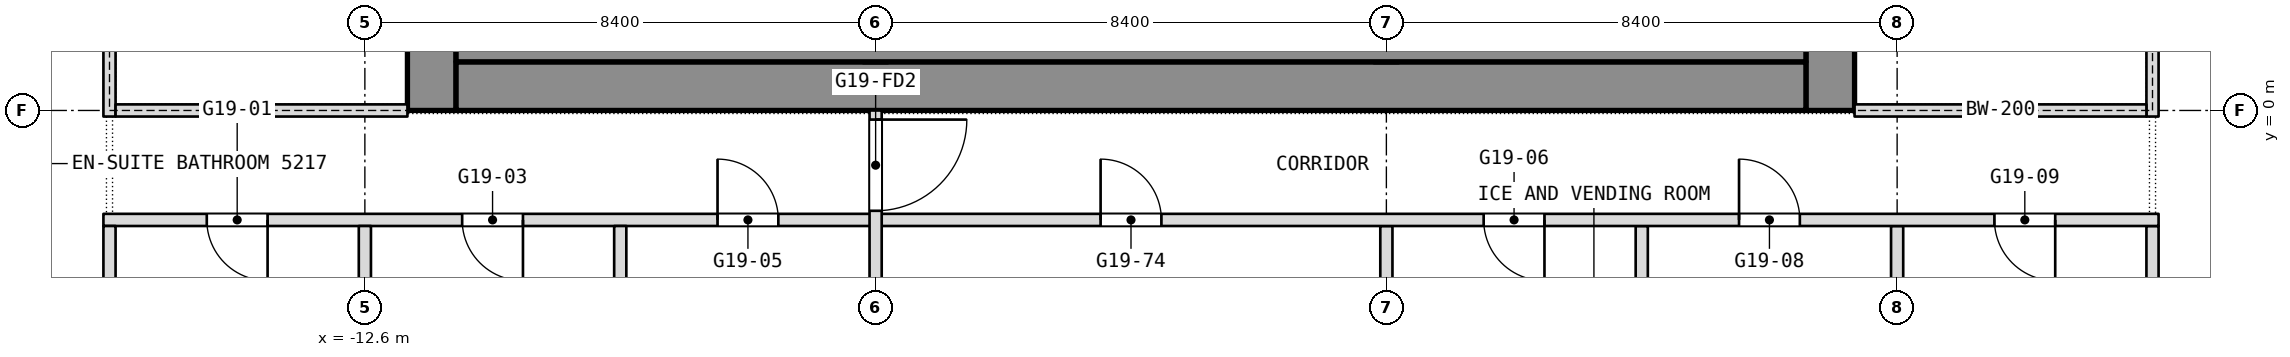
"""IFC4 building model, lengths in metres.
Left out: names, types, materials, properties, quantities, classifications, styles, units other than length and angle.
Written with IfcOpenShell. Run it as: python <this file> out.ifc"""

import sys

from ifc_helpers import new_model, si_unit, direction, frame, frame_2d, origin, place, context, subcontext, project, spatial, rectangle, extrude, element, fill, save


model = new_model("IFC4")
c1 = context("Model", 3, precision=1e-05, world=origin(), true_north=direction((0.0, 1.0)))
c2 = subcontext(c1, "Body", "Model", "MODEL_VIEW")
j1 = project(units=[si_unit("LENGTHUNIT", "METRE"), si_unit("PLANEANGLEUNIT", "RADIAN")], contexts=[c1])
p1 = place(None, origin())
s1 = spatial("IfcSite", under=j1, at=p1, CompositionType="ELEMENT")
p2 = place(p1, origin())
s2 = spatial("IfcBuilding", under=s1, at=p2, CompositionType="ELEMENT")
p3 = place(p2, frame((0.0, 0.0, 223.7)))
s3 = spatial("IfcBuildingStorey", under=s2, at=p3, CompositionType="ELEMENT", Elevation=223.7)
p4 = place(p3, frame((11.5, 0.0, 0.0), z_axis=(0.0, 0.0, 1.0), x_axis=(0.0, 1.0, 0.0)))
e1 = element("IfcWall", 1, at=p4, inside=s3, PredefinedType="SHEAR", context=c2, shape_type="SweptSolid", body=[
    extrude(rectangle(XDim=16.8, YDim=0.8, at=frame_2d((8.4, 0.0))), origin(), (0.0, 0.0, 1.0), 3.6),
])
p5 = place(p4, frame((2.3, 0.0, 0.0)))
e2 = element("IfcOpeningElement", 2, at=p5, cuts=e1, PredefinedType="OPENING", context=c2, shape_type="SweptSolid", body=[
    extrude(rectangle(XDim=1.1, YDim=2.1, at=frame_2d((0.55, 1.05))), frame((0.0, 0.4, 0.0), z_axis=(0.0, -1.0, 0.0), x_axis=(1.0, 0.0, 0.0)), (0.0, 0.0, 1.0), 0.8),
])
p6 = place(p4, frame((4.85, 0.0, 0.0)))
e3 = element("IfcOpeningElement", 3, at=p6, cuts=e1, PredefinedType="OPENING", context=c2, shape_type="SweptSolid", body=[
    extrude(rectangle(XDim=1.1, YDim=2.1, at=frame_2d((0.55, 1.05))), frame((0.0, 0.4, 0.0), z_axis=(0.0, -1.0, 0.0), x_axis=(1.0, 0.0, 0.0)), (0.0, 0.0, 1.0), 0.8),
])
p7 = place(p4, frame((6.825, 0.0, 0.0)))
e4 = element("IfcOpeningElement", 4, at=p7, cuts=e1, PredefinedType="OPENING", context=c2, shape_type="SweptSolid", body=[
    extrude(rectangle(XDim=1.2, YDim=2.1, at=frame_2d((0.6, 1.05))), frame((0.0, 0.4, 0.0), z_axis=(0.0, -1.0, 0.0), x_axis=(1.0, 0.0, 0.0)), (0.0, 0.0, 1.0), 0.8),
])
p8 = place(p4, frame((13.4, 0.0, 0.0)))
e5 = element("IfcOpeningElement", 5, at=p8, cuts=e1, PredefinedType="OPENING", context=c2, shape_type="SweptSolid", body=[
    extrude(rectangle(XDim=1.1, YDim=2.1, at=frame_2d((0.55, 1.05))), frame((0.0, 0.4, 0.0), z_axis=(0.0, -1.0, 0.0), x_axis=(1.0, 0.0, 0.0)), (0.0, 0.0, 1.0), 0.8),
])
p9 = place(p4, frame((10.85, 0.0, 0.0)))
e6 = element("IfcOpeningElement", 6, at=p9, cuts=e1, PredefinedType="OPENING", context=c2, shape_type="SweptSolid", body=[
    extrude(rectangle(XDim=1.1, YDim=2.1, at=frame_2d((0.55, 1.05))), frame((0.0, 0.4, 0.0), z_axis=(0.0, -1.0, 0.0), x_axis=(1.0, 0.0, 0.0)), (0.0, 0.0, 1.0), 0.8),
])
p10 = place(p4, frame((8.775, 0.0, 0.0)))
e7 = element("IfcOpeningElement", 7, at=p10, cuts=e1, PredefinedType="OPENING", context=c2, shape_type="SweptSolid", body=[
    extrude(rectangle(XDim=1.2, YDim=2.1, at=frame_2d((0.6, 1.05))), frame((0.0, 0.4, 0.0), z_axis=(0.0, -1.0, 0.0), x_axis=(1.0, 0.0, 0.0)), (0.0, 0.0, 1.0), 0.8),
])
p11 = place(p3, frame((-11.5, 0.0, 0.0), z_axis=(0.0, 0.0, 1.0), x_axis=(0.0, 1.0, 0.0)))
e8 = element("IfcWall", 8, at=p11, inside=s3, PredefinedType="SHEAR", context=c2, shape_type="SweptSolid", body=[
    extrude(rectangle(XDim=16.8, YDim=0.8, at=frame_2d((8.4, 0.0))), origin(), (0.0, 0.0, 1.0), 3.6),
])
p12 = place(p11, frame((1.688, 0.0, 0.0)))
e9 = element("IfcOpeningElement", 9, at=p12, cuts=e8, PredefinedType="OPENING", context=c2, shape_type="SweptSolid", body=[
    extrude(rectangle(XDim=0.9, YDim=2.1, at=frame_2d((0.45, 1.05))), frame((0.0, 0.4, 0.0), z_axis=(0.0, -1.0, 0.0), x_axis=(1.0, 0.0, 0.0)), (0.0, 0.0, 1.0), 0.8),
])
p13 = place(p11, frame((4.312, 0.0, 0.0)))
e10 = element("IfcOpeningElement", 10, at=p13, cuts=e8, PredefinedType="OPENING", context=c2, shape_type="SweptSolid", body=[
    extrude(rectangle(XDim=0.9, YDim=2.1, at=frame_2d((0.45, 1.05))), frame((0.0, 0.4, 0.0), z_axis=(0.0, -1.0, 0.0), x_axis=(1.0, 0.0, 0.0)), (0.0, 0.0, 1.0), 0.8),
])
p14 = place(p11, frame((6.825, 0.0, 0.0)))
e11 = element("IfcOpeningElement", 11, at=p14, cuts=e8, PredefinedType="OPENING", context=c2, shape_type="SweptSolid", body=[
    extrude(rectangle(XDim=1.2, YDim=2.1, at=frame_2d((0.6, 1.05))), frame((0.0, 0.4, 0.0), z_axis=(0.0, -1.0, 0.0), x_axis=(1.0, 0.0, 0.0)), (0.0, 0.0, 1.0), 0.8),
])
p15 = place(p11, frame((12.3, 0.0, 0.0)))
e12 = element("IfcOpeningElement", 12, at=p15, cuts=e8, PredefinedType="OPENING", context=c2, shape_type="SweptSolid", body=[
    extrude(rectangle(XDim=0.9, YDim=2.1, at=frame_2d((0.45, 1.05))), frame((0.0, 0.4, 0.0), z_axis=(0.0, -1.0, 0.0), x_axis=(1.0, 0.0, 0.0)), (0.0, 0.0, 1.0), 0.8),
])
p16 = place(p11, frame((8.775, 0.0, 0.0)))
e13 = element("IfcOpeningElement", 13, at=p16, cuts=e8, PredefinedType="OPENING", context=c2, shape_type="SweptSolid", body=[
    extrude(rectangle(XDim=1.2, YDim=2.1, at=frame_2d((0.6, 1.05))), frame((0.0, 0.4, 0.0), z_axis=(0.0, -1.0, 0.0), x_axis=(1.0, 0.0, 0.0)), (0.0, 0.0, 1.0), 0.8),
])
p17 = place(p3, frame((-11.1, 0.4, 0.0), z_axis=(0.0, 0.0, 1.0), x_axis=(1.0, 0.0, 0.0)))
e14 = element("IfcWall", 14, at=p17, inside=s3, PredefinedType="SHEAR", context=c2, shape_type="SweptSolid", body=[
    extrude(rectangle(XDim=22.2, YDim=0.8, at=frame_2d((11.1, 0.0))), origin(), (0.0, 0.0, 1.0), 3.6),
])
p18 = place(p3, frame((-4.2, 0.8, 0.0), z_axis=(0.0, 0.0, 1.0), x_axis=(0.0, 1.0, 0.0)))
e15 = element("IfcWall", 15, at=p18, inside=s3, PredefinedType="SHEAR", context=c2, shape_type="SweptSolid", body=[
    extrude(rectangle(XDim=15.2, YDim=0.4, at=frame_2d((7.6, 0.0))), origin(), (0.0, 0.0, 1.0), 3.6),
])
p19 = place(p18, frame((8.5, 0.0, 0.0)))
e16 = element("IfcOpeningElement", 16, at=p19, cuts=e15, PredefinedType="OPENING", context=c2, shape_type="SweptSolid", body=[
    extrude(rectangle(XDim=1.2, YDim=2.1, at=frame_2d((0.6, 1.05))), frame((0.0, 0.2, 0.0), z_axis=(0.0, -1.0, 0.0), x_axis=(1.0, 0.0, 0.0)), (0.0, 0.0, 1.0), 0.4),
])
p20 = place(p3, frame((4.2, 0.8, 0.0), z_axis=(0.0, 0.0, 1.0), x_axis=(0.0, 1.0, 0.0)))
e17 = element("IfcWall", 17, at=p20, inside=s3, PredefinedType="SHEAR", context=c2, shape_type="SweptSolid", body=[
    extrude(rectangle(XDim=15.2, YDim=0.4, at=frame_2d((7.6, 0.0))), origin(), (0.0, 0.0, 1.0), 3.6),
])
p21 = place(p20, frame((5.95, 0.0, 0.0)))
e18 = element("IfcOpeningElement", 18, at=p21, cuts=e17, PredefinedType="OPENING", context=c2, shape_type="SweptSolid", body=[
    extrude(rectangle(XDim=1.2, YDim=2.1, at=frame_2d((0.6, 1.05))), frame((0.0, 0.2, 0.0), z_axis=(0.0, -1.0, 0.0), x_axis=(1.0, 0.0, 0.0)), (0.0, 0.0, 1.0), 0.4),
])
for number, where, z_axis, x_axis in (
    (19, (16.8, -7.8, 0.0), (0.0, 0.0, 1.0), (0.0, 1.0, 0.0)),
    (20, (12.6, -7.8, 0.0), (0.0, 0.0, 1.0), (0.0, 1.0, 0.0)),
):
    element("IfcWall", number, at=place(p3, frame(where, z_axis=z_axis, x_axis=x_axis)), inside=s3, PredefinedType="PARTITIONING", context=c2, shape_type="SweptSolid", body=[
        extrude(rectangle(XDim=5.9, YDim=0.2, at=frame_2d((2.95, 0.0))), origin(), (0.0, 0.0, 1.0), 3.34),
    ])
p22 = place(p3, frame((8.4, -8.0, 0.0), z_axis=(0.0, 0.0, 1.0), x_axis=(0.0, 1.0, 0.0)))
e21 = element("IfcWall", 21, at=p22, inside=s3, PredefinedType="PARTITIONING", context=c2, shape_type="SweptSolid", body=[
    extrude(rectangle(XDim=6.1, YDim=0.2, at=frame_2d((3.05, 0.0))), origin(), (0.0, 0.0, 1.0), 3.34),
])
p23 = place(p3, frame((4.2, -11.6, 0.0), z_axis=(0.0, 0.0, 1.0), x_axis=(0.0, 1.0, 0.0)))
e22 = element("IfcWall", 22, at=p23, inside=s3, PredefinedType="PARTITIONING", context=c2, shape_type="SweptSolid", body=[
    extrude(rectangle(XDim=9.7, YDim=0.2, at=frame_2d((4.85, 0.0))), origin(), (0.0, 0.0, 1.0), 3.34),
])
p24 = place(p3, frame((-16.9, -1.8, 0.0), z_axis=(0.0, 0.0, 1.0), x_axis=(1.0, 0.0, 0.0)))
e23 = element("IfcWall", 23, at=p24, inside=s3, PredefinedType="PARTITIONING", context=c2, shape_type="SweptSolid", body=[
    extrude(rectangle(XDim=33.8, YDim=0.2, at=frame_2d((16.9, 0.0))), origin(), (0.0, 0.0, 1.0), 3.34),
])
p25 = place(p24, frame((1.7, 0.0, 0.0)))
e24 = element("IfcOpeningElement", 24, at=p25, cuts=e23, PredefinedType="OPENING", context=c2, shape_type="SweptSolid", body=[
    extrude(rectangle(XDim=1.0, YDim=2.1, at=frame_2d((0.5, 1.05))), frame((0.0, 0.1, 0.0), z_axis=(0.0, -1.0, 0.0), x_axis=(1.0, 0.0, 0.0)), (0.0, 0.0, 1.0), 0.2),
])
p26 = place(p24, frame((5.9, 0.0, 0.0)))
e25 = element("IfcOpeningElement", 25, at=p26, cuts=e23, PredefinedType="OPENING", context=c2, shape_type="SweptSolid", body=[
    extrude(rectangle(XDim=1.0, YDim=2.1, at=frame_2d((0.5, 1.05))), frame((0.0, 0.1, 0.0), z_axis=(0.0, -1.0, 0.0), x_axis=(1.0, 0.0, 0.0)), (0.0, 0.0, 1.0), 0.2),
])
p27 = place(p24, frame((10.1, 0.0, 0.0)))
e26 = element("IfcOpeningElement", 26, at=p27, cuts=e23, PredefinedType="OPENING", context=c2, shape_type="SweptSolid", body=[
    extrude(rectangle(XDim=1.0, YDim=2.1, at=frame_2d((0.5, 1.05))), frame((0.0, 0.1, 0.0), z_axis=(0.0, -1.0, 0.0), x_axis=(1.0, 0.0, 0.0)), (0.0, 0.0, 1.0), 0.2),
])
p28 = place(p24, frame((22.7, 0.0, 0.0)))
e27 = element("IfcOpeningElement", 27, at=p28, cuts=e23, PredefinedType="OPENING", context=c2, shape_type="SweptSolid", body=[
    extrude(rectangle(XDim=1.0, YDim=2.1, at=frame_2d((0.5, 1.05))), frame((0.0, 0.1, 0.0), z_axis=(0.0, -1.0, 0.0), x_axis=(1.0, 0.0, 0.0)), (0.0, 0.0, 1.0), 0.2),
])
p29 = place(p24, frame((26.9, 0.0, 0.0)))
e28 = element("IfcOpeningElement", 28, at=p29, cuts=e23, PredefinedType="OPENING", context=c2, shape_type="SweptSolid", body=[
    extrude(rectangle(XDim=1.0, YDim=2.1, at=frame_2d((0.5, 1.05))), frame((0.0, 0.1, 0.0), z_axis=(0.0, -1.0, 0.0), x_axis=(1.0, 0.0, 0.0)), (0.0, 0.0, 1.0), 0.2),
])
p30 = place(p24, frame((31.1, 0.0, 0.0)))
e29 = element("IfcOpeningElement", 29, at=p30, cuts=e23, PredefinedType="OPENING", context=c2, shape_type="SweptSolid", body=[
    extrude(rectangle(XDim=1.0, YDim=2.1, at=frame_2d((0.5, 1.05))), frame((0.0, 0.1, 0.0), z_axis=(0.0, -1.0, 0.0), x_axis=(1.0, 0.0, 0.0)), (0.0, 0.0, 1.0), 0.2),
])
p31 = place(p24, frame((16.4, 0.0, 0.0)))
e30 = element("IfcOpeningElement", 30, at=p31, cuts=e23, PredefinedType="OPENING", context=c2, shape_type="SweptSolid", body=[
    extrude(rectangle(XDim=1.0, YDim=2.1, at=frame_2d((0.5, 1.05))), frame((0.0, 0.1, 0.0), z_axis=(0.0, -1.0, 0.0), x_axis=(1.0, 0.0, 0.0)), (0.0, 0.0, 1.0), 0.2),
])
p32 = place(p3, frame((-4.2, -13.6, 0.0), z_axis=(0.0, 0.0, 1.0), x_axis=(0.0, 1.0, 0.0)))
e31 = element("IfcWall", 31, at=p32, inside=s3, PredefinedType="PARTITIONING", context=c2, shape_type="SweptSolid", body=[
    extrude(rectangle(XDim=13.6, YDim=0.2, at=frame_2d((6.8, 0.0))), origin(), (0.0, 0.0, 1.0), 3.34),
])
p33 = place(p32, frame((11.95, 0.0, 0.0)))
e32 = element("IfcOpeningElement", 32, at=p33, cuts=e31, PredefinedType="OPENING", context=c2, shape_type="SweptSolid", body=[
    extrude(rectangle(XDim=1.5, YDim=2.1, at=frame_2d((0.75, 1.05))), frame((0.0, 0.1, 0.0), z_axis=(0.0, -1.0, 0.0), x_axis=(1.0, 0.0, 0.0)), (0.0, 0.0, 1.0), 0.2),
])
p34 = place(p32, frame((0.25, 0.0, 0.0)))
e33 = element("IfcOpeningElement", 33, at=p34, cuts=e31, PredefinedType="OPENING", context=c2, shape_type="SweptSolid", body=[
    extrude(rectangle(XDim=1.5, YDim=2.1, at=frame_2d((0.75, 1.05))), frame((0.0, 0.1, 0.0), z_axis=(0.0, -1.0, 0.0), x_axis=(1.0, 0.0, 0.0)), (0.0, 0.0, 1.0), 0.2),
])
p35 = place(p3, frame((-8.4, -8.0, 0.0), z_axis=(0.0, 0.0, 1.0), x_axis=(0.0, 1.0, 0.0)))
e34 = element("IfcWall", 34, at=p35, inside=s3, PredefinedType="PARTITIONING", context=c2, shape_type="SweptSolid", body=[
    extrude(rectangle(XDim=6.1, YDim=0.2, at=frame_2d((3.05, 0.0))), origin(), (0.0, 0.0, 1.0), 3.34),
])
p36 = place(p3, frame((-12.6, -7.8, 0.0), z_axis=(0.0, 0.0, 1.0), x_axis=(0.0, 1.0, 0.0)))
e35 = element("IfcWall", 35, at=p36, inside=s3, PredefinedType="PARTITIONING", context=c2, shape_type="SweptSolid", body=[
    extrude(rectangle(XDim=5.9, YDim=0.2, at=frame_2d((2.95, 0.0))), origin(), (0.0, 0.0, 1.0), 3.34),
])
p37 = place(p3, frame((-16.8, -8.0, 0.0), z_axis=(0.0, 0.0, 1.0), x_axis=(0.0, 1.0, 0.0)))
e36 = element("IfcWall", 36, at=p37, inside=s3, PredefinedType="PARTITIONING", context=c2, shape_type="SweptSolid", body=[
    extrude(rectangle(XDim=6.1, YDim=0.2, at=frame_2d((3.05, 0.0))), origin(), (0.0, 0.0, 1.0), 3.34),
])
p38 = place(p3, frame((-11.1, 1.15, 0.0), z_axis=(0.0, 0.0, 1.0), x_axis=(1.0, 0.0, 0.0)))
e37 = element("IfcWall", 37, at=p38, inside=s3, PredefinedType="PARTITIONING", context=c2, shape_type="SweptSolid", body=[
    extrude(rectangle(XDim=22.2, YDim=0.7, at=frame_2d((11.1, 0.0))), origin(), (0.0, 0.0, 1.0), 3.34),
])
p39 = place(p3, frame((-16.8, -0.1, 0.0), z_axis=(0.0, 0.0, 1.0), x_axis=(0.0, 1.0, 0.0)))
e38 = element("IfcWall", 38, at=p39, inside=s3, PredefinedType="PARTITIONING", context=c2, shape_type="SweptSolid", body=[
    extrude(rectangle(XDim=17.0, YDim=0.2, at=frame_2d((8.5, 0.0))), origin(), (0.0, 0.0, 1.0), 3.34),
])
p40 = place(p39, frame((2.2, 0.0, 0.0)))
e39 = element("IfcOpeningElement", 39, at=p40, cuts=e38, PredefinedType="OPENING", context=c2, shape_type="SweptSolid", body=[
    extrude(rectangle(XDim=1.8, YDim=2.1, at=frame_2d((0.9, 1.05))), frame((0.0, 0.1, 0.0), z_axis=(0.0, -1.0, 0.0), x_axis=(1.0, 0.0, 0.0)), (0.0, 0.0, 1.0), 0.2),
])
p41 = place(p39, frame((13.0, 0.0, 0.0)))
e40 = element("IfcOpeningElement", 40, at=p41, cuts=e38, PredefinedType="OPENING", context=c2, shape_type="SweptSolid", body=[
    extrude(rectangle(XDim=1.8, YDim=2.1, at=frame_2d((0.9, 1.05))), frame((0.0, 0.1, 0.0), z_axis=(0.0, -1.0, 0.0), x_axis=(1.0, 0.0, 0.0)), (0.0, 0.0, 1.0), 0.2),
])
p42 = place(p3, frame((-16.7, 0.0, 0.0), z_axis=(0.0, 0.0, 1.0), x_axis=(1.0, 0.0, 0.0)))
e41 = element("IfcWall", 41, at=p42, inside=s3, PredefinedType="PARTITIONING", context=c2, shape_type="SweptSolid", body=[
    extrude(rectangle(XDim=4.8, YDim=0.2, at=frame_2d((2.4, 0.0))), origin(), (0.0, 0.0, 1.0), 2.94),
])
p43 = place(p3, frame((16.8, -0.1, 0.0), z_axis=(0.0, 0.0, 1.0), x_axis=(0.0, 1.0, 0.0)))
e42 = element("IfcWall", 42, at=p43, inside=s3, PredefinedType="PARTITIONING", context=c2, shape_type="SweptSolid", body=[
    extrude(rectangle(XDim=17.0, YDim=0.2, at=frame_2d((8.5, 0.0))), origin(), (0.0, 0.0, 1.0), 3.34),
])
p44 = place(p43, frame((2.2, 0.0, 0.0)))
e43 = element("IfcOpeningElement", 43, at=p44, cuts=e42, PredefinedType="OPENING", context=c2, shape_type="SweptSolid", body=[
    extrude(rectangle(XDim=1.8, YDim=2.1, at=frame_2d((0.9, 1.05))), frame((0.0, 0.1, 0.0), z_axis=(0.0, -1.0, 0.0), x_axis=(1.0, 0.0, 0.0)), (0.0, 0.0, 1.0), 0.2),
])
p45 = place(p43, frame((13.0, 0.0, 0.0)))
e44 = element("IfcOpeningElement", 44, at=p45, cuts=e42, PredefinedType="OPENING", context=c2, shape_type="SweptSolid", body=[
    extrude(rectangle(XDim=1.8, YDim=2.1, at=frame_2d((0.9, 1.05))), frame((0.0, 0.1, 0.0), z_axis=(0.0, -1.0, 0.0), x_axis=(1.0, 0.0, 0.0)), (0.0, 0.0, 1.0), 0.2),
])
p46 = place(p3, frame((11.9, 0.0, 0.0), z_axis=(0.0, 0.0, 1.0), x_axis=(1.0, 0.0, 0.0)))
e45 = element("IfcWall", 45, at=p46, inside=s3, PredefinedType="PARTITIONING", context=c2, shape_type="SweptSolid", body=[
    extrude(rectangle(XDim=4.8, YDim=0.2, at=frame_2d((2.4, 0.0))), origin(), (0.0, 0.0, 1.0), 2.94),
])
p47 = place(p25, origin())
e46 = element("IfcDoor", 46, at=p47, inside=s3, OperationType="SINGLE_SWING_LEFT", PredefinedType="DOOR", context=c2, shape_type="SweptSolid", body=[
    extrude(rectangle(XDim=1.0, YDim=2.1, at=frame_2d((0.5, 1.05))), frame((0.0, 0.025, 0.0), z_axis=(0.0, -1.0, 0.0), x_axis=(1.0, 0.0, 0.0)), (0.0, 0.0, 1.0), 0.05),
])
fill(e24, e46)
p48 = place(p26, origin())
e47 = element("IfcDoor", 47, at=p48, inside=s3, OperationType="SINGLE_SWING_LEFT", PredefinedType="DOOR", context=c2, shape_type="SweptSolid", body=[
    extrude(rectangle(XDim=1.0, YDim=2.1, at=frame_2d((0.5, 1.05))), frame((0.0, 0.025, 0.0), z_axis=(0.0, -1.0, 0.0), x_axis=(1.0, 0.0, 0.0)), (0.0, 0.0, 1.0), 0.05),
])
fill(e25, e47)
p49 = place(p27, origin())
e48 = element("IfcDoor", 48, at=p49, inside=s3, OperationType="SINGLE_SWING_RIGHT", PredefinedType="DOOR", context=c2, shape_type="SweptSolid", body=[
    extrude(rectangle(XDim=1.0, YDim=2.1, at=frame_2d((0.5, 1.05))), frame((0.0, 0.025, 0.0), z_axis=(0.0, -1.0, 0.0), x_axis=(1.0, 0.0, 0.0)), (0.0, 0.0, 1.0), 0.05),
])
fill(e26, e48)
p50 = place(p28, origin())
e49 = element("IfcDoor", 49, at=p50, inside=s3, OperationType="SINGLE_SWING_RIGHT", PredefinedType="DOOR", context=c2, shape_type="SweptSolid", body=[
    extrude(rectangle(XDim=1.0, YDim=2.1, at=frame_2d((0.5, 1.05))), frame((0.0, 0.025, 0.0), z_axis=(0.0, -1.0, 0.0), x_axis=(1.0, 0.0, 0.0)), (0.0, 0.0, 1.0), 0.05),
])
fill(e27, e49)
p51 = place(p29, origin())
e50 = element("IfcDoor", 50, at=p51, inside=s3, OperationType="SINGLE_SWING_LEFT", PredefinedType="DOOR", context=c2, shape_type="SweptSolid", body=[
    extrude(rectangle(XDim=1.0, YDim=2.1, at=frame_2d((0.5, 1.05))), frame((0.0, 0.025, 0.0), z_axis=(0.0, -1.0, 0.0), x_axis=(1.0, 0.0, 0.0)), (0.0, 0.0, 1.0), 0.05),
])
fill(e28, e50)
p52 = place(p30, origin())
e51 = element("IfcDoor", 51, at=p52, inside=s3, OperationType="SINGLE_SWING_LEFT", PredefinedType="DOOR", context=c2, shape_type="SweptSolid", body=[
    extrude(rectangle(XDim=1.0, YDim=2.1, at=frame_2d((0.5, 1.05))), frame((0.0, 0.025, 0.0), z_axis=(0.0, -1.0, 0.0), x_axis=(1.0, 0.0, 0.0)), (0.0, 0.0, 1.0), 0.05),
])
fill(e29, e51)
p53 = place(p31, origin())
e52 = element("IfcDoor", 52, at=p53, inside=s3, OperationType="SINGLE_SWING_LEFT", PredefinedType="DOOR", context=c2, shape_type="SweptSolid", body=[
    extrude(rectangle(XDim=1.0, YDim=2.1, at=frame_2d((0.5, 1.05))), frame((0.0, 0.025, 0.0), z_axis=(0.0, -1.0, 0.0), x_axis=(1.0, 0.0, 0.0)), (0.0, 0.0, 1.0), 0.05),
])
fill(e30, e52)
p54 = place(p33, origin())
e53 = element("IfcDoor", 53, at=p54, inside=s3, OperationType="DOUBLE_DOOR_DOUBLE_SWING", PredefinedType="DOOR", context=c2, shape_type="SweptSolid", body=[
    extrude(rectangle(XDim=1.5, YDim=2.1, at=frame_2d((0.75, 1.05))), frame((0.0, 0.025, 0.0), z_axis=(0.0, -1.0, 0.0), x_axis=(1.0, 0.0, 0.0)), (0.0, 0.0, 1.0), 0.05),
])
fill(e32, e53)
save(model, sys.argv[1])
